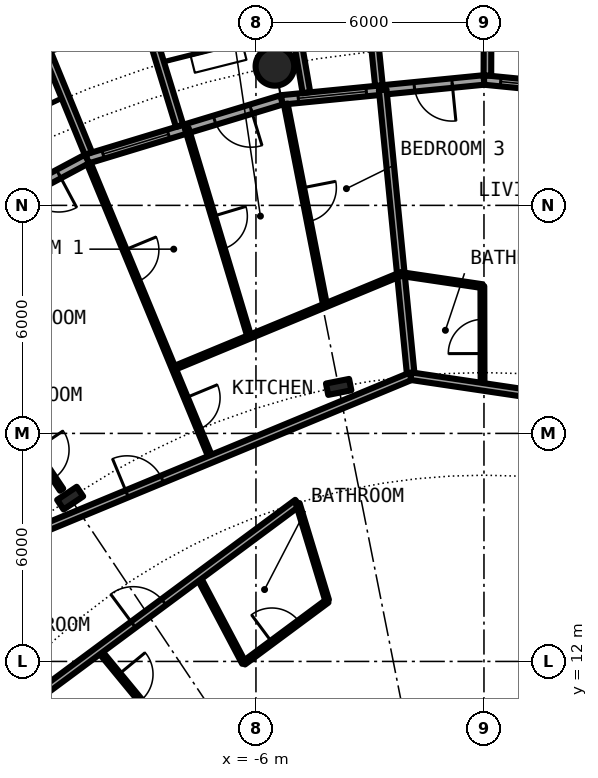
"""IFC4 building model, lengths in metres.
Left out: names, types, materials, properties, quantities, classifications, styles, units other than length and angle.
Written with IfcOpenShell. Run it as: python <this file> out.ifc"""

import sys

from ifc_helpers import new_model, si_unit, direction, frame, frame_2d, origin, origin_2d, place, context, subcontext, project, spatial, rectangle, circle, hollow_circle, i_section, extrude, element, fill, save


model = new_model("IFC4")
c1 = context("Model", 3, precision=1e-05, world=origin(), true_north=direction((0.0, 1.0)))
c2 = subcontext(c1, "Body", "Model", "MODEL_VIEW")
j1 = project(units=[si_unit("LENGTHUNIT", "METRE"), si_unit("PLANEANGLEUNIT", "RADIAN")], contexts=[c1])
p1 = place(None, origin())
s1 = spatial("IfcSite", under=j1, at=p1, CompositionType="ELEMENT")
p2 = place(p1, origin())
s2 = spatial("IfcBuilding", under=s1, at=p2, CompositionType="ELEMENT")
p3 = place(p2, frame((0.0, 0.0, 50.25)))
s3 = spatial("IfcBuildingStorey", under=s2, at=p3, CompositionType="ELEMENT", Elevation=50.25)
p4 = place(p3, frame((-5.501, 27.658, 0.0), z_axis=(0.0, 0.0, 1.0), x_axis=(1.0, 0.0, 0.0)))
e1 = element("IfcColumn", 1, at=p4, inside=s3, PredefinedType="COLUMN", context=c2, shape_type="SweptSolid", body=[
    extrude(hollow_circle(Radius=0.508, WallThickness=0.05, at=origin_2d()), origin(), (0.0, 0.0, 1.0), 3.05),
])
for number, where, z_axis, x_axis in (
    (2, (-3.824, 19.223, 0.0), (0.0, 0.0, 1.0), (-0.195, 0.981, 0.0)),
    (3, (-10.889, 16.297, 0.0), (0.0, 0.0, 1.0), (-0.556, 0.831, 0.0)),
):
    element("IfcColumn", number, at=place(p3, frame(where, z_axis=z_axis, x_axis=x_axis)), inside=s3, PredefinedType="COLUMN", context=c2, shape_type="SweptSolid", body=[
        extrude(i_section(OverallWidth=0.305, OverallDepth=0.62, WebThickness=0.021, FlangeThickness=0.04, FilletRadius=0.027, at=origin_2d()), origin(), (0.0, 0.0, 1.0), 3.05),
    ])
p5 = place(p3, frame((5.326, 26.775, 0.0), z_axis=(0.0, 0.0, 1.0), x_axis=(-0.995173996315, 0.098126026407, 0.0)))
e4 = element("IfcWall", 4, at=p5, inside=s3, PredefinedType="SOLIDWALL", context=c2, shape_type="SweptSolid", body=[
    extrude(rectangle(XDim=5.352, YDim=0.25, at=frame_2d((2.676, 0.0))), origin(), (0.0, 0.0, 1.0), 2.7),
])
p6 = place(p5, frame((0.841, 0.0, 0.0)))
e5 = element("IfcOpeningElement", 5, at=p6, cuts=e4, PredefinedType="OPENING", context=c2, shape_type="SweptSolid", body=[
    extrude(rectangle(XDim=1.0, YDim=2.2, at=frame_2d((0.5, 1.1))), frame((0.0, 0.135, 0.0), z_axis=(0.0, -1.0, 0.0), x_axis=(1.0, 0.0, 0.0)), (0.0, 0.0, 1.0), 0.27),
])
p7 = place(p5, frame((3.111, 0.0, 0.3)))
e6 = element("IfcOpeningElement", 6, at=p7, cuts=e4, PredefinedType="OPENING", context=c2, shape_type="SweptSolid", body=[
    extrude(rectangle(XDim=1.8, YDim=2.1, at=frame_2d((0.9, 1.05))), frame((0.0, 0.135, 0.0), z_axis=(0.0, -1.0, 0.0), x_axis=(1.0, 0.0, 0.0)), (0.0, 0.0, 1.0), 0.27),
])
p8 = place(p3, frame((0.09, 27.417, -0.03), z_axis=(0.0, 0.0, 1.0), x_axis=(0.00347308367, 0.999993968827, 0.0)))
e7 = element("IfcWall", 7, at=p8, inside=s3, PredefinedType="SOLIDWALL", context=c2, shape_type="SweptSolid", body=[
    extrude(rectangle(XDim=2.882, YDim=0.2, at=frame_2d((1.441, 0.0))), origin(), (0.0, 0.0, 1.0), 2.73),
])
p9 = place(p3, frame((0.0, 27.3, 0.0), z_axis=(0.0, 0.0, 1.0), x_axis=(-0.995173996315, -0.098126026407, 0.0)))
e8 = element("IfcWall", 8, at=p9, inside=s3, PredefinedType="SOLIDWALL", context=c2, shape_type="SweptSolid", body=[
    extrude(rectangle(XDim=5.352, YDim=0.25, at=frame_2d((2.676, 0.0))), origin(), (0.0, 0.0, 1.0), 2.7),
])
p10 = place(p9, frame((0.841, 0.0, 0.0)))
e9 = element("IfcOpeningElement", 9, at=p10, cuts=e8, PredefinedType="OPENING", context=c2, shape_type="SweptSolid", body=[
    extrude(rectangle(XDim=1.0, YDim=2.2, at=frame_2d((0.5, 1.1))), frame((0.0, 0.135, 0.0), z_axis=(0.0, -1.0, 0.0), x_axis=(1.0, 0.0, 0.0)), (0.0, 0.0, 1.0), 0.27),
])
p11 = place(p9, frame((3.111, 0.0, 0.3)))
e10 = element("IfcOpeningElement", 10, at=p11, cuts=e8, PredefinedType="OPENING", context=c2, shape_type="SweptSolid", body=[
    extrude(rectangle(XDim=1.8, YDim=2.1, at=frame_2d((0.9, 1.05))), frame((0.0, 0.135, 0.0), z_axis=(0.0, -1.0, 0.0), x_axis=(1.0, 0.0, 0.0)), (0.0, 0.0, 1.0), 0.27),
])
p12 = place(p3, frame((-2.764, 27.153, -0.03), z_axis=(0.0, 0.0, 1.0), x_axis=(-0.101505487237, 0.994834979311, 0.0)))
e11 = element("IfcWall", 11, at=p12, inside=s3, PredefinedType="SOLIDWALL", context=c2, shape_type="SweptSolid", body=[
    extrude(rectangle(XDim=3.007, YDim=0.2, at=frame_2d((1.503, 0.0))), origin(), (0.0, 0.0, 1.0), 2.73),
])
p13 = place(p3, frame((-4.671, 26.966, -0.03), z_axis=(0.0, 0.0, 1.0), x_axis=(-0.170539878907, 0.985350774954, 0.0)))
e12 = element("IfcWall", 12, at=p13, inside=s3, PredefinedType="SOLIDWALL", context=c2, shape_type="SweptSolid", body=[
    extrude(rectangle(XDim=2.932, YDim=0.2, at=frame_2d((1.466, 0.0))), origin(), (0.0, 0.0, 1.0), 2.73),
])
p14 = place(p3, frame((-5.326, 26.775, 0.0), z_axis=(0.0, 0.0, 1.0), x_axis=(-0.956965678721, -0.290201119486, 0.0)))
e13 = element("IfcWall", 13, at=p14, inside=s3, PredefinedType="SOLIDWALL", context=c2, shape_type="SweptSolid", body=[
    extrude(rectangle(XDim=5.351, YDim=0.25, at=frame_2d((2.676, 0.0))), origin(), (0.0, 0.0, 1.0), 2.7),
])
p15 = place(p14, frame((0.841, 0.0, 0.0)))
e14 = element("IfcOpeningElement", 14, at=p15, cuts=e13, PredefinedType="OPENING", context=c2, shape_type="SweptSolid", body=[
    extrude(rectangle(XDim=1.0, YDim=2.2, at=frame_2d((0.5, 1.1))), frame((0.0, 0.135, 0.0), z_axis=(0.0, -1.0, 0.0), x_axis=(1.0, 0.0, 0.0)), (0.0, 0.0, 1.0), 0.27),
])
p16 = place(p14, frame((3.111, 0.0, 0.3)))
e15 = element("IfcOpeningElement", 15, at=p16, cuts=e13, PredefinedType="OPENING", context=c2, shape_type="SweptSolid", body=[
    extrude(rectangle(XDim=1.8, YDim=2.1, at=frame_2d((0.9, 1.05))), frame((0.0, 0.135, 0.0), z_axis=(0.0, -1.0, 0.0), x_axis=(1.0, 0.0, 0.0)), (0.0, 0.0, 1.0), 0.27),
])
p17 = place(p3, frame((-8.82, 29.093, -0.03), z_axis=(0.0, 0.0, 1.0), x_axis=(-0.941461077774, -0.337121697664, 0.0)))
e16 = element("IfcWall", 16, at=p17, inside=s3, PredefinedType="SOLIDWALL", context=c2, shape_type="SweptSolid", body=[
    extrude(rectangle(XDim=2.993, YDim=0.2, at=frame_2d((1.497, 0.0))), origin(), (0.0, 0.0, 1.0), 2.73),
])
p18 = place(p17, frame((0.457, 0.0, 0.33)))
e17 = element("IfcOpeningElement", 17, at=p18, cuts=e16, PredefinedType="OPENING", context=c2, shape_type="SweptSolid", body=[
    extrude(circle(Radius=1.04, at=frame_2d((1.04, 1.04))), frame((0.0, 0.11, 0.0), z_axis=(0.0, -1.0, 0.0), x_axis=(1.0, 0.0, 0.0)), (0.0, 0.0, 1.0), 0.22),
])
p19 = place(p3, frame((-8.009, 26.092, -0.03), z_axis=(0.0, 0.0, 1.0), x_axis=(-0.293406695073, 0.955987715029, 0.0)))
e18 = element("IfcWall", 18, at=p19, inside=s3, PredefinedType="SOLIDWALL", context=c2, shape_type="SweptSolid", body=[
    extrude(rectangle(XDim=3.006, YDim=0.2, at=frame_2d((1.503, 0.0))), origin(), (0.0, 0.0, 1.0), 2.73),
])
p20 = place(p3, frame((-10.409, 25.364, -0.03), z_axis=(0.0, 0.0, 1.0), x_axis=(-0.379509886562, 0.925187681501, 0.0)))
e19 = element("IfcWall", 19, at=p20, inside=s3, PredefinedType="SOLIDWALL", context=c2, shape_type="SweptSolid", body=[
    extrude(rectangle(XDim=2.883, YDim=0.2, at=frame_2d((1.441, 0.0))), origin(), (0.0, 0.0, 1.0), 2.73),
])
p21 = place(p3, frame((-10.447, 25.222, 0.0), z_axis=(0.0, 0.0, 1.0), x_axis=(-0.881915646801, -0.471407246368, 0.0)))
e20 = element("IfcWall", 20, at=p21, inside=s3, PredefinedType="SOLIDWALL", context=c2, shape_type="SweptSolid", body=[
    extrude(rectangle(XDim=5.352, YDim=0.25, at=frame_2d((2.676, 0.0))), origin(), (0.0, 0.0, 1.0), 2.7),
])
p22 = place(p21, frame((0.841, 0.0, 0.0)))
e21 = element("IfcOpeningElement", 21, at=p22, cuts=e20, PredefinedType="OPENING", context=c2, shape_type="SweptSolid", body=[
    extrude(rectangle(XDim=1.0, YDim=2.2, at=frame_2d((0.5, 1.1))), frame((0.0, 0.135, 0.0), z_axis=(0.0, -1.0, 0.0), x_axis=(1.0, 0.0, 0.0)), (0.0, 0.0, 1.0), 0.27),
])
p23 = place(p21, frame((3.111, 0.0, 0.3)))
e22 = element("IfcOpeningElement", 22, at=p23, cuts=e20, PredefinedType="OPENING", context=c2, shape_type="SweptSolid", body=[
    extrude(rectangle(XDim=1.8, YDim=2.1, at=frame_2d((0.9, 1.05))), frame((0.0, 0.135, 0.0), z_axis=(0.0, -1.0, 0.0), x_axis=(1.0, 0.0, 0.0)), (0.0, 0.0, 1.0), 0.27),
])
p24 = place(p3, frame((-10.398, 25.107, 0.0), z_axis=(0.0, 0.0, 1.0), x_axis=(0.382458509789, -0.923972666419, 0.0)))
e23 = element("IfcWall", 23, at=p24, inside=s3, PredefinedType="PARTITIONING", context=c2, shape_type="SweptSolid", body=[
    extrude(rectangle(XDim=8.419, YDim=0.1, at=frame_2d((4.209, 0.0))), origin(), (0.0, 0.0, 1.0), 2.7),
])
p25 = place(p24, frame((6.677, 0.0, 0.0)))
e24 = element("IfcOpeningElement", 24, at=p25, cuts=e23, PredefinedType="OPENING", context=c2, shape_type="SweptSolid", body=[
    extrude(rectangle(XDim=0.9, YDim=2.3, at=frame_2d((0.45, 1.15))), frame((0.0, 0.06, 0.0), z_axis=(0.0, -1.0, 0.0), x_axis=(1.0, 0.0, 0.0)), (0.0, 0.0, 1.0), 0.12),
])
p26 = place(p24, frame((2.468, 0.0, 0.0)))
e25 = element("IfcOpeningElement", 25, at=p26, cuts=e23, PredefinedType="OPENING", context=c2, shape_type="SweptSolid", body=[
    extrude(rectangle(XDim=0.9, YDim=2.3, at=frame_2d((0.45, 1.15))), frame((0.0, 0.06, 0.0), z_axis=(0.0, -1.0, 0.0), x_axis=(1.0, 0.0, 0.0)), (0.0, 0.0, 1.0), 0.12),
])
p27 = place(p3, frame((-12.153, 18.064, 0.0), z_axis=(0.0, 0.0, 1.0), x_axis=(0.558084773293, -0.829783939239, 0.0)))
e26 = element("IfcWall", 26, at=p27, inside=s3, PredefinedType="PARTITIONING", context=c2, shape_type="SweptSolid", body=[
    extrude(rectangle(XDim=1.862, YDim=0.1, at=frame_2d((0.931, 0.0))), origin(), (0.0, 0.0, 1.0), 2.7),
])
p28 = place(p27, frame((0.6, 0.0, 0.0)))
e27 = element("IfcOpeningElement", 27, at=p28, cuts=e26, PredefinedType="OPENING", context=c2, shape_type="SweptSolid", body=[
    extrude(rectangle(XDim=0.9, YDim=2.3, at=frame_2d((0.45, 1.15))), frame((0.0, 0.06, 0.0), z_axis=(0.0, -1.0, 0.0), x_axis=(1.0, 0.0, 0.0)), (0.0, 0.0, 1.0), 0.12),
])
p29 = place(p3, frame((-10.132, 12.296, 0.0), z_axis=(0.0, 0.0, 1.0), x_axis=(0.635976043025, -0.771708800454, 0.0)))
e28 = element("IfcWall", 28, at=p29, inside=s3, PredefinedType="PARTITIONING", context=c2, shape_type="SweptSolid", body=[
    extrude(rectangle(XDim=8.213, YDim=0.1, at=frame_2d((4.106, 0.0))), origin(), (0.0, 0.0, 1.0), 2.7),
])
p30 = place(p29, frame((0.823, 0.0, 0.0)))
e29 = element("IfcOpeningElement", 29, at=p30, cuts=e28, PredefinedType="OPENING", context=c2, shape_type="SweptSolid", body=[
    extrude(rectangle(XDim=0.9, YDim=2.3, at=frame_2d((0.45, 1.15))), frame((0.0, 0.06, 0.0), z_axis=(0.0, -1.0, 0.0), x_axis=(1.0, 0.0, 0.0)), (0.0, 0.0, 1.0), 0.12),
])
p31 = place(p29, frame((4.929, 0.0, 0.0)))
e30 = element("IfcOpeningElement", 30, at=p31, cuts=e28, PredefinedType="OPENING", context=c2, shape_type="SweptSolid", body=[
    extrude(rectangle(XDim=0.9, YDim=2.3, at=frame_2d((0.45, 1.15))), frame((0.0, 0.06, 0.0), z_axis=(0.0, -1.0, 0.0), x_axis=(1.0, 0.0, 0.0)), (0.0, 0.0, 1.0), 0.12),
])
p32 = place(p3, frame((-7.821, 26.025, 0.0), z_axis=(0.0, 0.0, 1.0), x_axis=(0.287793773423, -0.957692405723, 0.0)))
e31 = element("IfcWall", 31, at=p32, inside=s3, PredefinedType="PARTITIONING", context=c2, shape_type="SweptSolid", body=[
    extrude(rectangle(XDim=5.726, YDim=0.1, at=frame_2d((2.863, 0.0))), origin(), (0.0, 0.0, 1.0), 2.7),
])
p33 = place(p32, frame((2.413, 0.0, 0.0)))
e32 = element("IfcOpeningElement", 32, at=p33, cuts=e31, PredefinedType="OPENING", context=c2, shape_type="SweptSolid", body=[
    extrude(rectangle(XDim=0.9, YDim=2.3, at=frame_2d((0.45, 1.15))), frame((0.0, 0.06, 0.0), z_axis=(0.0, -1.0, 0.0), x_axis=(1.0, 0.0, 0.0)), (0.0, 0.0, 1.0), 0.12),
])
p34 = place(p3, frame((-7.519, 14.234, 0.0), z_axis=(0.0, 0.0, 1.0), x_axis=(0.467001992543, -0.884256263173, 0.0)))
e33 = element("IfcWall", 33, at=p34, inside=s3, PredefinedType="PARTITIONING", context=c2, shape_type="SweptSolid", body=[
    extrude(rectangle(XDim=2.572, YDim=0.1, at=frame_2d((1.286, 0.0))), origin(), (0.0, 0.0, 1.0), 2.7),
])
p35 = place(p3, frame((-5.217, 26.67, 0.0), z_axis=(0.0, 0.0, 1.0), x_axis=(0.192109041462, -0.981373586453, 0.0)))
e34 = element("IfcWall", 34, at=p35, inside=s3, PredefinedType="PARTITIONING", context=c2, shape_type="SweptSolid", body=[
    extrude(rectangle(XDim=5.404, YDim=0.1, at=frame_2d((2.702, 0.0))), origin(), (0.0, 0.0, 1.0), 2.7),
])
p36 = place(p35, frame((2.252, 0.0, 0.0)))
e35 = element("IfcOpeningElement", 35, at=p36, cuts=e34, PredefinedType="OPENING", context=c2, shape_type="SweptSolid", body=[
    extrude(rectangle(XDim=0.9, YDim=2.3, at=frame_2d((0.45, 1.15))), frame((0.0, 0.06, 0.0), z_axis=(0.0, -1.0, 0.0), x_axis=(1.0, 0.0, 0.0)), (0.0, 0.0, 1.0), 0.12),
])
p37 = place(p3, frame((-2.665, 27.044, 0.0), z_axis=(0.0, 0.0, 1.0), x_axis=(0.098083473227, -0.99517819122, 0.0)))
e36 = element("IfcWall", 36, at=p37, inside=s3, PredefinedType="PARTITIONING", context=c2, shape_type="SweptSolid", body=[
    extrude(rectangle(XDim=7.574, YDim=0.2, at=frame_2d((3.787, 0.0))), origin(), (0.0, 0.0, 1.0), 2.7),
])
p38 = place(p3, frame((-0.037, 19.226, 0.0), z_axis=(0.0, 0.0, 1.0), x_axis=(-0.001843314841, 0.999998301094, 0.0)))
e37 = element("IfcWall", 37, at=p38, inside=s3, PredefinedType="PARTITIONING", context=c2, shape_type="SweptSolid", body=[
    extrude(rectangle(XDim=2.649, YDim=0.1, at=frame_2d((1.324, 0.0))), origin(), (0.0, 0.0, 1.0), 2.7),
])
p39 = place(p38, frame((0.875, 0.0, 0.0)))
e38 = element("IfcOpeningElement", 38, at=p39, cuts=e37, PredefinedType="OPENING", context=c2, shape_type="SweptSolid", body=[
    extrude(rectangle(XDim=0.9, YDim=2.3, at=frame_2d((0.45, 1.15))), frame((0.0, 0.06, 0.0), z_axis=(0.0, -1.0, 0.0), x_axis=(1.0, 0.0, 0.0)), (0.0, 0.0, 1.0), 0.12),
])
p40 = place(p3, frame((-6.318, 11.96, 0.0), z_axis=(0.0, 0.0, 1.0), x_axis=(0.803128348509, 0.595806055542, 0.0)))
e39 = element("IfcWall", 39, at=p40, inside=s3, PredefinedType="PARTITIONING", context=c2, shape_type="SweptSolid", body=[
    extrude(rectangle(XDim=2.734, YDim=0.1, at=frame_2d((1.367, 0.0))), origin(), (0.0, 0.0, 1.0), 2.7),
])
p41 = place(p40, frame((0.917, 0.0, 0.0)))
e40 = element("IfcOpeningElement", 40, at=p41, cuts=e39, PredefinedType="OPENING", context=c2, shape_type="SweptSolid", body=[
    extrude(rectangle(XDim=0.9, YDim=2.3, at=frame_2d((0.45, 1.15))), frame((0.0, 0.06, 0.0), z_axis=(0.0, -1.0, 0.0), x_axis=(1.0, 0.0, 0.0)), (0.0, 0.0, 1.0), 0.12),
])
p42 = place(p3, frame((-14.037, 9.4, 0.0), z_axis=(0.0, 0.0, 1.0), x_axis=(0.803202106898, 0.595706618626, 0.0)))
e41 = element("IfcWall", 41, at=p42, inside=s3, PredefinedType="PARTITIONING", context=c2, shape_type="SweptSolid", body=[
    extrude(rectangle(XDim=11.368, YDim=0.2, at=frame_2d((5.684, 0.0))), origin(), (0.0, 0.0, 1.0), 2.7),
])
p43 = place(p42, frame((5.988, 0.0, 0.0)))
e42 = element("IfcOpeningElement", 42, at=p43, cuts=e41, PredefinedType="OPENING", context=c2, shape_type="SweptSolid", body=[
    extrude(rectangle(XDim=1.0, YDim=2.3, at=frame_2d((0.5, 1.15))), frame((0.0, 0.11, 0.0), z_axis=(0.0, -1.0, 0.0), x_axis=(1.0, 0.0, 0.0)), (0.0, 0.0, 1.0), 0.22),
])
p44 = place(p3, frame((-12.435, 15.15, 0.0), z_axis=(0.0, 0.0, 1.0), x_axis=(0.923845560554, 0.38276543763, 0.0)))
e43 = element("IfcWall", 43, at=p44, inside=s3, PredefinedType="PARTITIONING", context=c2, shape_type="SweptSolid", body=[
    extrude(rectangle(XDim=11.381, YDim=0.2, at=frame_2d((5.69, 0.0))), origin(), (0.0, 0.0, 1.0), 2.7),
])
p45 = place(p44, frame((3.293, 0.0, 0.0)))
e44 = element("IfcOpeningElement", 44, at=p45, cuts=e43, PredefinedType="OPENING", context=c2, shape_type="SweptSolid", body=[
    extrude(rectangle(XDim=1.0, YDim=2.3, at=frame_2d((0.5, 1.15))), frame((0.0, 0.11, 0.0), z_axis=(0.0, -1.0, 0.0), x_axis=(1.0, 0.0, 0.0)), (0.0, 0.0, 1.0), 0.22),
])
p46 = place(p3, frame((-1.921, 19.506, 0.0), z_axis=(0.0, 0.0, 1.0), x_axis=(0.989134446023, -0.147013767014, 0.0)))
e45 = element("IfcWall", 45, at=p46, inside=s3, PredefinedType="PARTITIONING", context=c2, shape_type="SweptSolid", body=[
    extrude(rectangle(XDim=9.531, YDim=0.2, at=frame_2d((4.765, 0.0))), origin(), (0.0, 0.0, 1.0), 2.38),
])
p47 = place(p46, frame((3.31, 0.0, 0.0)))
e46 = element("IfcOpeningElement", 46, at=p47, cuts=e45, PredefinedType="OPENING", context=c2, shape_type="SweptSolid", body=[
    extrude(rectangle(XDim=1.0, YDim=2.3, at=frame_2d((0.5, 1.15))), frame((0.0, 0.11, 0.0), z_axis=(0.0, -1.0, 0.0), x_axis=(1.0, 0.0, 0.0)), (0.0, 0.0, 1.0), 0.22),
])
p48 = place(p3, frame((-8.166, 19.715, 0.0), z_axis=(0.0, 0.0, 1.0), x_axis=(0.923844914631, 0.382766996632, 0.0)))
e47 = element("IfcWall", 47, at=p48, inside=s3, PredefinedType="PARTITIONING", context=c2, shape_type="SweptSolid", body=[
    extrude(rectangle(XDim=6.474, YDim=0.1, at=frame_2d((3.237, 0.0))), origin(), (0.0, 0.0, 1.0), 2.7),
])
p49 = place(p3, frame((-2.186, 22.193, 0.0), z_axis=(0.0, 0.0, 1.0), x_axis=(0.989171386505, -0.146765009863, 0.0)))
e48 = element("IfcWall", 48, at=p49, inside=s3, PredefinedType="PARTITIONING", context=c2, shape_type="SweptSolid", body=[
    extrude(rectangle(XDim=2.167, YDim=0.1, at=frame_2d((1.084, 0.0))), origin(), (0.0, 0.0, 1.0), 2.7),
])
p50 = place(p3, frame((-4.9, 16.152, 0.0), z_axis=(0.0, 0.0, 1.0), x_axis=(0.290456070925, -0.956888327269, 0.0)))
e49 = element("IfcWall", 49, at=p50, inside=s3, PredefinedType="PARTITIONING", context=c2, shape_type="SweptSolid", body=[
    extrude(rectangle(XDim=2.658, YDim=0.1, at=frame_2d((1.329, 0.0))), origin(), (0.0, 0.0, 1.0), 2.7),
])
p51 = place(p7, origin())
e50 = element("IfcWindow", 50, at=p51, inside=s3, PartitioningType="SINGLE_PANEL", PredefinedType="WINDOW", context=c2, shape_type="SweptSolid", body=[
    extrude(rectangle(XDim=1.8, YDim=2.1, at=frame_2d((0.9, 1.05))), frame((0.0, 0.03, 0.0), z_axis=(0.0, -1.0, 0.0), x_axis=(1.0, 0.0, 0.0)), (0.0, 0.0, 1.0), 0.06),
])
fill(e6, e50)
p52 = place(p10, origin())
e51 = element("IfcDoor", 51, at=p52, inside=s3, OperationType="SINGLE_SWING_LEFT", PredefinedType="DOOR", context=c2, shape_type="SweptSolid", body=[
    extrude(rectangle(XDim=1.0, YDim=2.2, at=frame_2d((0.5, 1.1))), frame((0.0, 0.025, 0.0), z_axis=(0.0, -1.0, 0.0), x_axis=(1.0, 0.0, 0.0)), (0.0, 0.0, 1.0), 0.05),
])
fill(e9, e51)
p53 = place(p11, origin())
e52 = element("IfcWindow", 52, at=p53, inside=s3, PartitioningType="SINGLE_PANEL", PredefinedType="WINDOW", context=c2, shape_type="SweptSolid", body=[
    extrude(rectangle(XDim=1.8, YDim=2.1, at=frame_2d((0.9, 1.05))), frame((0.0, 0.03, 0.0), z_axis=(0.0, -1.0, 0.0), x_axis=(1.0, 0.0, 0.0)), (0.0, 0.0, 1.0), 0.06),
])
fill(e10, e52)
p54 = place(p15, origin())
e53 = element("IfcDoor", 53, at=p54, inside=s3, OperationType="SINGLE_SWING_LEFT", PredefinedType="DOOR", context=c2, shape_type="SweptSolid", body=[
    extrude(rectangle(XDim=1.0, YDim=2.2, at=frame_2d((0.5, 1.1))), frame((0.0, 0.025, 0.0), z_axis=(0.0, -1.0, 0.0), x_axis=(1.0, 0.0, 0.0)), (0.0, 0.0, 1.0), 0.05),
])
fill(e14, e53)
p55 = place(p16, origin())
e54 = element("IfcWindow", 54, at=p55, inside=s3, PartitioningType="SINGLE_PANEL", PredefinedType="WINDOW", context=c2, shape_type="SweptSolid", body=[
    extrude(rectangle(XDim=1.8, YDim=2.1, at=frame_2d((0.9, 1.05))), frame((0.0, 0.03, 0.0), z_axis=(0.0, -1.0, 0.0), x_axis=(1.0, 0.0, 0.0)), (0.0, 0.0, 1.0), 0.06),
])
fill(e15, e54)
p56 = place(p22, origin())
e55 = element("IfcDoor", 55, at=p56, inside=s3, OperationType="SINGLE_SWING_LEFT", PredefinedType="DOOR", context=c2, shape_type="SweptSolid", body=[
    extrude(rectangle(XDim=1.0, YDim=2.2, at=frame_2d((0.5, 1.1))), frame((0.0, 0.025, 0.0), z_axis=(0.0, -1.0, 0.0), x_axis=(1.0, 0.0, 0.0)), (0.0, 0.0, 1.0), 0.05),
])
fill(e21, e55)
p57 = place(p39, origin())
e56 = element("IfcDoor", 56, at=p57, inside=s3, OperationType="SINGLE_SWING_RIGHT", PredefinedType="DOOR", context=c2, shape_type="SweptSolid", body=[
    extrude(rectangle(XDim=0.9, YDim=2.3, at=frame_2d((0.45, 1.15))), frame((0.0, 0.025, 0.0), z_axis=(0.0, -1.0, 0.0), x_axis=(1.0, 0.0, 0.0)), (0.0, 0.0, 1.0), 0.05),
])
fill(e38, e56)
p58 = place(p45, origin())
e57 = element("IfcDoor", 57, at=p58, inside=s3, OperationType="SINGLE_SWING_LEFT", PredefinedType="DOOR", context=c2, shape_type="SweptSolid", body=[
    extrude(rectangle(XDim=1.0, YDim=2.3, at=frame_2d((0.5, 1.15))), frame((0.0, 0.025, 0.0), z_axis=(0.0, -1.0, 0.0), x_axis=(1.0, 0.0, 0.0)), (0.0, 0.0, 1.0), 0.05),
])
fill(e44, e57)
p59 = place(p28, origin())
e58 = element("IfcDoor", 58, at=p59, inside=s3, OperationType="SINGLE_SWING_RIGHT", PredefinedType="DOOR", context=c2, shape_type="SweptSolid", body=[
    extrude(rectangle(XDim=0.9, YDim=2.3, at=frame_2d((0.45, 1.15))), frame((0.0, 0.025, 0.0), z_axis=(0.0, -1.0, 0.0), x_axis=(1.0, 0.0, 0.0)), (0.0, 0.0, 1.0), 0.05),
])
fill(e27, e58)
p60 = place(p25, origin())
e59 = element("IfcDoor", 59, at=p60, inside=s3, OperationType="SINGLE_SWING_RIGHT", PredefinedType="DOOR", context=c2, shape_type="SweptSolid", body=[
    extrude(rectangle(XDim=0.9, YDim=2.3, at=frame_2d((0.45, 1.15))), frame((0.0, 0.025, 0.0), z_axis=(0.0, -1.0, 0.0), x_axis=(1.0, 0.0, 0.0)), (0.0, 0.0, 1.0), 0.05),
])
fill(e24, e59)
p61 = place(p26, origin())
e60 = element("IfcDoor", 60, at=p61, inside=s3, OperationType="SINGLE_SWING_LEFT", PredefinedType="DOOR", context=c2, shape_type="SweptSolid", body=[
    extrude(rectangle(XDim=0.9, YDim=2.3, at=frame_2d((0.45, 1.15))), frame((0.0, 0.025, 0.0), z_axis=(0.0, -1.0, 0.0), x_axis=(1.0, 0.0, 0.0)), (0.0, 0.0, 1.0), 0.05),
])
fill(e25, e60)
p62 = place(p33, origin())
e61 = element("IfcDoor", 61, at=p62, inside=s3, OperationType="SINGLE_SWING_LEFT", PredefinedType="DOOR", context=c2, shape_type="SweptSolid", body=[
    extrude(rectangle(XDim=0.9, YDim=2.3, at=frame_2d((0.45, 1.15))), frame((0.0, 0.025, 0.0), z_axis=(0.0, -1.0, 0.0), x_axis=(1.0, 0.0, 0.0)), (0.0, 0.0, 1.0), 0.05),
])
fill(e32, e61)
p63 = place(p36, origin())
e62 = element("IfcDoor", 62, at=p63, inside=s3, OperationType="SINGLE_SWING_RIGHT", PredefinedType="DOOR", context=c2, shape_type="SweptSolid", body=[
    extrude(rectangle(XDim=0.9, YDim=2.3, at=frame_2d((0.45, 1.15))), frame((0.0, 0.025, 0.0), z_axis=(0.0, -1.0, 0.0), x_axis=(1.0, 0.0, 0.0)), (0.0, 0.0, 1.0), 0.05),
])
fill(e35, e62)
p64 = place(p43, origin())
e63 = element("IfcDoor", 63, at=p64, inside=s3, OperationType="SINGLE_SWING_RIGHT", PredefinedType="DOOR", context=c2, shape_type="SweptSolid", body=[
    extrude(rectangle(XDim=1.0, YDim=2.3, at=frame_2d((0.5, 1.15))), frame((0.0, 0.025, 0.0), z_axis=(0.0, -1.0, 0.0), x_axis=(1.0, 0.0, 0.0)), (0.0, 0.0, 1.0), 0.05),
])
fill(e42, e63)
p65 = place(p41, origin())
e64 = element("IfcDoor", 64, at=p65, inside=s3, OperationType="SINGLE_SWING_RIGHT", PredefinedType="DOOR", context=c2, shape_type="SweptSolid", body=[
    extrude(rectangle(XDim=0.9, YDim=2.3, at=frame_2d((0.45, 1.15))), frame((0.0, 0.025, 0.0), z_axis=(0.0, -1.0, 0.0), x_axis=(1.0, 0.0, 0.0)), (0.0, 0.0, 1.0), 0.05),
])
fill(e40, e64)
p66 = place(p30, origin())
e65 = element("IfcDoor", 65, at=p66, inside=s3, OperationType="SINGLE_SWING_LEFT", PredefinedType="DOOR", context=c2, shape_type="SweptSolid", body=[
    extrude(rectangle(XDim=0.9, YDim=2.3, at=frame_2d((0.45, 1.15))), frame((0.0, 0.025, 0.0), z_axis=(0.0, -1.0, 0.0), x_axis=(1.0, 0.0, 0.0)), (0.0, 0.0, 1.0), 0.05),
])
fill(e29, e65)
save(model, sys.argv[1])
